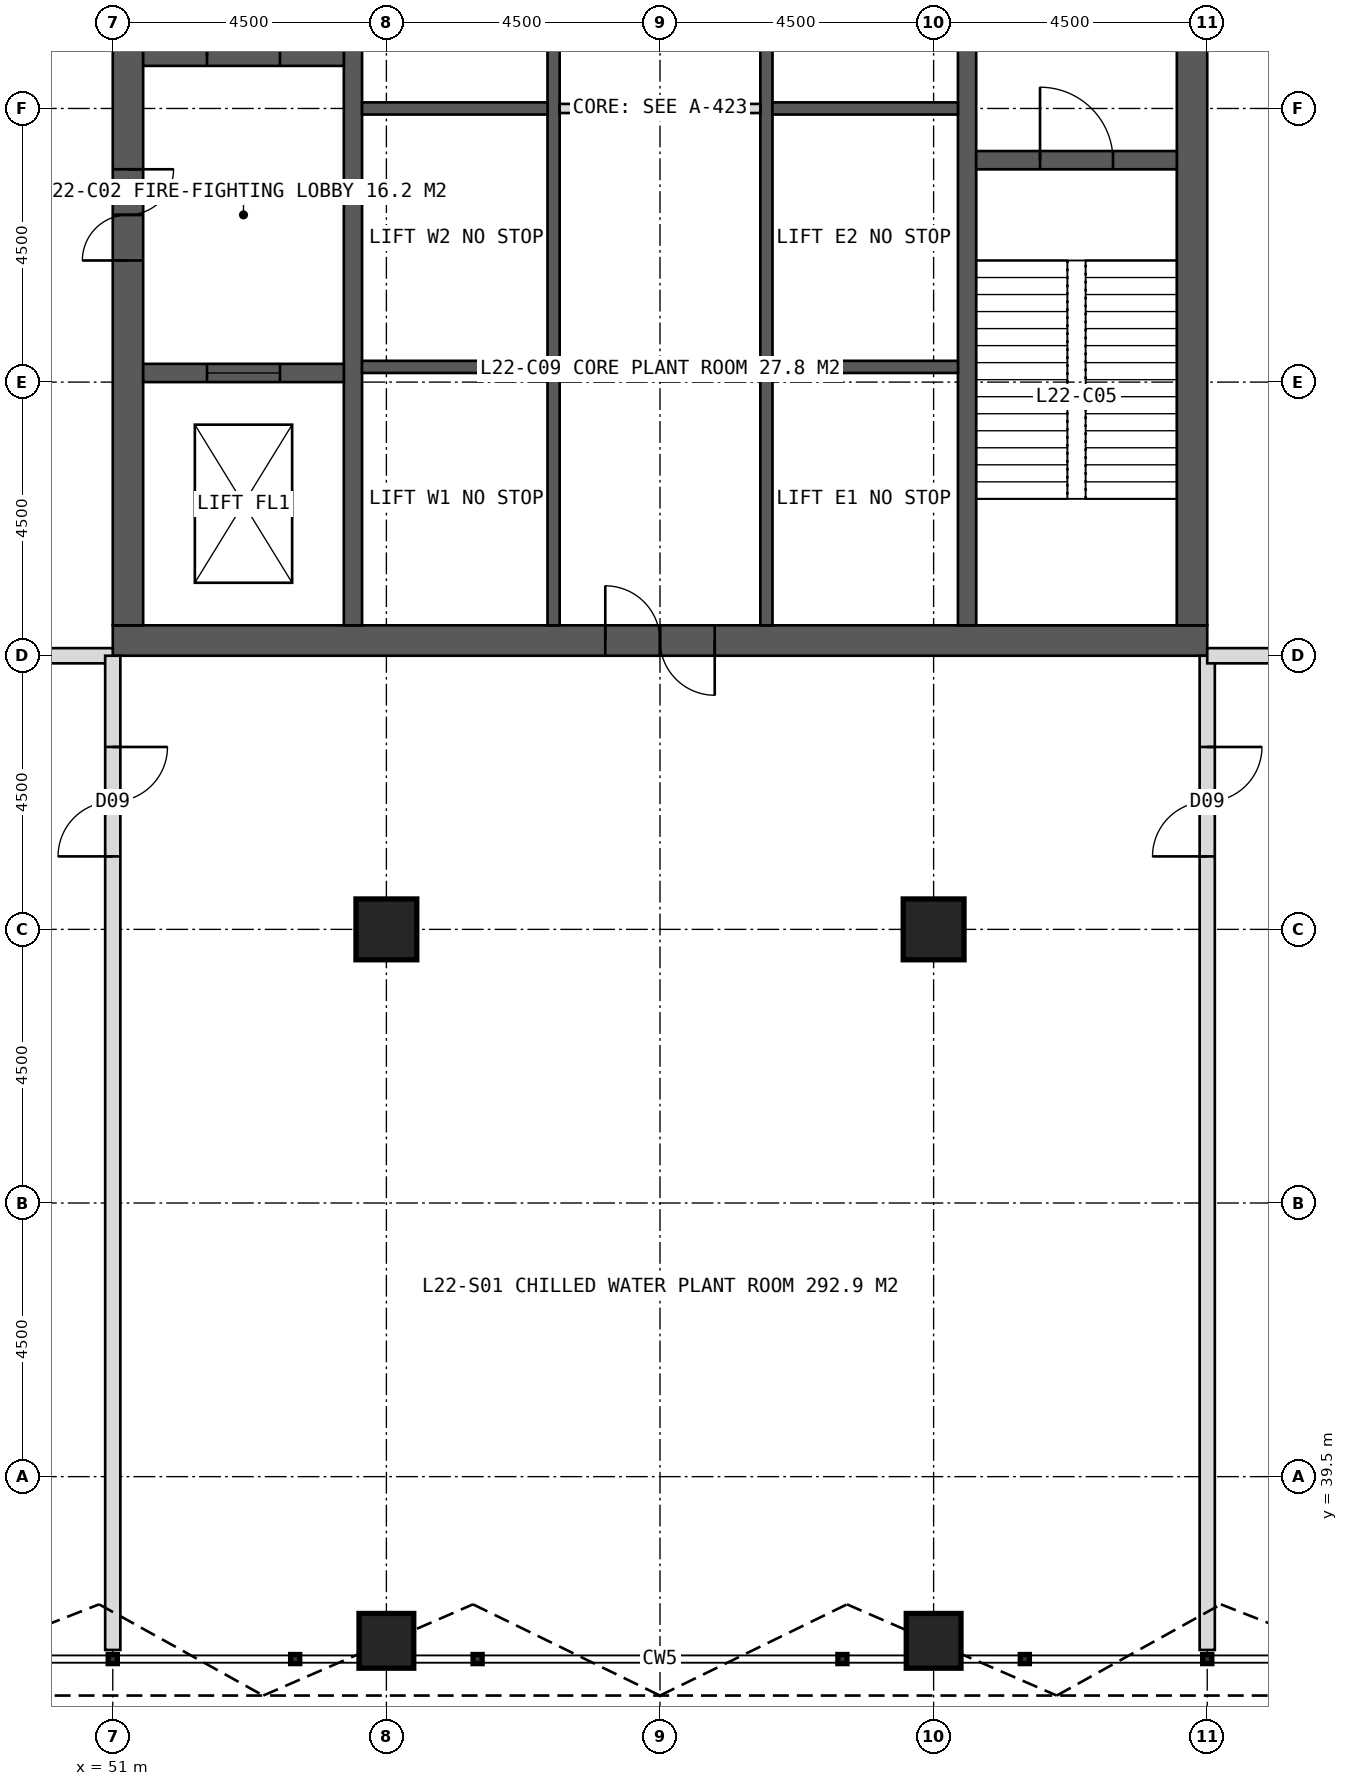
"""IFC4 building model, lengths in metres.
Left out: names, types, materials, properties, quantities, classifications, styles, units other than length and angle.
Written with IfcOpenShell. Run it as: python <this file> out.ifc"""

import sys

from ifc_helpers import new_model, si_unit, direction, frame, frame_2d, origin, origin_2d, place, context, subcontext, project, spatial, rectangle, hollow_rectangle, extrude, element, fill, save


model = new_model("IFC4")
c1 = context("Model", 3, precision=1e-05, world=origin(), true_north=direction((0.0, 1.0)))
c2 = subcontext(c1, "Body", "Model", "MODEL_VIEW")
j1 = project(units=[si_unit("LENGTHUNIT", "METRE"), si_unit("PLANEANGLEUNIT", "RADIAN")], contexts=[c1])
p1 = place(None, origin())
s1 = spatial("IfcSite", under=j1, at=p1, CompositionType="ELEMENT")
p2 = place(p1, origin())
s2 = spatial("IfcBuilding", under=s1, at=p2, CompositionType="ELEMENT")
p3 = place(p2, frame((0.0, 0.0, 95.0)))
s3 = spatial("IfcBuildingStorey", under=s2, at=p3, CompositionType="ELEMENT", Elevation=95.0)
p4 = place(p3, frame((51.0, 53.25, 0.0), z_axis=(0.0, 0.0, 1.0), x_axis=(1.0, 0.0, 0.0)))
e1 = element("IfcWall", 1, at=p4, inside=s3, PredefinedType="SHEAR", context=c2, shape_type="SweptSolid", body=[
    extrude(rectangle(XDim=18.0, YDim=0.5, at=frame_2d((9.0, 0.0))), origin(), (0.0, 0.0, 1.0), 5.0),
])
p5 = place(p4, frame((8.1, 0.0, 0.0)))
e2 = element("IfcOpeningElement", 2, at=p5, cuts=e1, PredefinedType="OPENING", context=c2, shape_type="SweptSolid", body=[
    extrude(rectangle(XDim=1.8, YDim=2.2, at=frame_2d((0.9, 1.1))), frame((0.0, 0.26, 0.0), z_axis=(0.0, -1.0, 0.0), x_axis=(1.0, 0.0, 0.0)), (0.0, 0.0, 1.0), 0.52),
])
p6 = place(p3, frame((51.25, 53.5, 0.0), z_axis=(0.0, 0.0, 1.0), x_axis=(0.0, 1.0, 0.0)))
e3 = element("IfcWall", 3, at=p6, inside=s3, PredefinedType="SHEAR", context=c2, shape_type="SweptSolid", body=[
    extrude(rectangle(XDim=17.0, YDim=0.5, at=frame_2d((8.5, 0.0))), origin(), (0.0, 0.0, 1.0), 5.0),
])
p7 = place(p6, frame((6.0, 0.0, 0.0)))
e4 = element("IfcOpeningElement", 4, at=p7, cuts=e3, PredefinedType="OPENING", context=c2, shape_type="SweptSolid", body=[
    extrude(rectangle(XDim=1.5, YDim=2.2, at=frame_2d((0.75, 1.1))), frame((0.0, 0.26, 0.0), z_axis=(0.0, -1.0, 0.0), x_axis=(1.0, 0.0, 0.0)), (0.0, 0.0, 1.0), 0.52),
])
p8 = place(p3, frame((68.75, 53.5, 0.0), z_axis=(0.0, 0.0, 1.0), x_axis=(0.0, 1.0, 0.0)))
e5 = element("IfcWall", 5, at=p8, inside=s3, PredefinedType="SHEAR", context=c2, shape_type="SweptSolid", body=[
    extrude(rectangle(XDim=17.0, YDim=0.5, at=frame_2d((8.5, 0.0))), origin(), (0.0, 0.0, 1.0), 5.0),
])
p9 = place(p8, frame((9.5, 0.0, 0.0)))
e6 = element("IfcOpeningElement", 6, at=p9, cuts=e5, PredefinedType="OPENING", context=c2, shape_type="SweptSolid", body=[
    extrude(rectangle(XDim=1.5, YDim=2.2, at=frame_2d((0.75, 1.1))), frame((0.0, 0.26, 0.0), z_axis=(0.0, -1.0, 0.0), x_axis=(1.0, 0.0, 0.0)), (0.0, 0.0, 1.0), 0.52),
])
for number, where, z_axis, x_axis in (
    (7, (54.95, 53.5, 0.0), (0.0, 0.0, 1.0), (0.0, 1.0, 0.0)),
    (8, (65.05, 53.5, 0.0), (0.0, 0.0, 1.0), (0.0, 1.0, 0.0)),
):
    element("IfcWall", number, at=place(p3, frame(where, z_axis=z_axis, x_axis=x_axis)), inside=s3, PredefinedType="SHEAR", context=c2, shape_type="SweptSolid", body=[
        extrude(rectangle(XDim=17.0, YDim=0.3, at=frame_2d((8.5, 0.0))), origin(), (0.0, 0.0, 1.0), 5.0),
    ])
for number, where, z_axis, x_axis in (
    (9, (58.25, 53.5, 0.0), (0.0, 0.0, 1.0), (0.0, 1.0, 0.0)),
    (10, (61.75, 53.5, 0.0), (0.0, 0.0, 1.0), (0.0, 1.0, 0.0)),
):
    element("IfcWall", number, at=place(p3, frame(where, z_axis=z_axis, x_axis=x_axis)), inside=s3, PredefinedType="SHEAR", context=c2, shape_type="SweptSolid", body=[
        extrude(rectangle(XDim=17.0, YDim=0.2, at=frame_2d((8.5, 0.0))), origin(), (0.0, 0.0, 1.0), 5.0),
    ])
for number, where, z_axis, x_axis in (
    (11, (55.1, 57.75, 0.0), (0.0, 0.0, 1.0), (1.0, 0.0, 0.0)),
    (12, (61.85, 57.75, 0.0), (0.0, 0.0, 1.0), (1.0, 0.0, 0.0)),
    (13, (55.1, 62.0, 0.0), (0.0, 0.0, 1.0), (1.0, 0.0, 0.0)),
    (14, (61.85, 62.0, 0.0), (0.0, 0.0, 1.0), (1.0, 0.0, 0.0)),
):
    element("IfcWall", number, at=place(p3, frame(where, z_axis=z_axis, x_axis=x_axis)), inside=s3, PredefinedType="SHEAR", context=c2, shape_type="SweptSolid", body=[
        extrude(rectangle(XDim=3.05, YDim=0.2, at=frame_2d((1.525, 0.0))), origin(), (0.0, 0.0, 1.0), 5.0),
    ])
p10 = place(p3, frame((51.5, 62.85, 0.0), z_axis=(0.0, 0.0, 1.0), x_axis=(1.0, 0.0, 0.0)))
e15 = element("IfcWall", 15, at=p10, inside=s3, PredefinedType="SHEAR", context=c2, shape_type="SweptSolid", body=[
    extrude(rectangle(XDim=3.3, YDim=0.3, at=frame_2d((1.65, 0.0))), origin(), (0.0, 0.0, 1.0), 5.0),
])
p11 = place(p10, frame((1.05, 0.0, 0.0)))
e16 = element("IfcOpeningElement", 16, at=p11, cuts=e15, PredefinedType="OPENING", context=c2, shape_type="SweptSolid", body=[
    extrude(rectangle(XDim=1.2, YDim=2.1, at=frame_2d((0.6, 1.05))), frame((0.0, 0.16, 0.0), z_axis=(0.0, -1.0, 0.0), x_axis=(1.0, 0.0, 0.0)), (0.0, 0.0, 1.0), 0.32),
])
p12 = place(p3, frame((51.5, 57.65, 0.0), z_axis=(0.0, 0.0, 1.0), x_axis=(1.0, 0.0, 0.0)))
e17 = element("IfcWall", 17, at=p12, inside=s3, PredefinedType="SHEAR", context=c2, shape_type="SweptSolid", body=[
    extrude(rectangle(XDim=3.3, YDim=0.3, at=frame_2d((1.65, 0.0))), origin(), (0.0, 0.0, 1.0), 5.0),
])
p13 = place(p12, frame((1.05, 0.0, 0.0)))
e18 = element("IfcOpeningElement", 18, at=p13, cuts=e17, PredefinedType="OPENING", context=c2, shape_type="SweptSolid", body=[
    extrude(rectangle(XDim=1.2, YDim=2.2, at=frame_2d((0.6, 1.1))), frame((0.0, 0.16, 0.0), z_axis=(0.0, -1.0, 0.0), x_axis=(1.0, 0.0, 0.0)), (0.0, 0.0, 1.0), 0.32),
])
p14 = place(p3, frame((65.2, 61.15, 0.0), z_axis=(0.0, 0.0, 1.0), x_axis=(1.0, 0.0, 0.0)))
e19 = element("IfcWall", 19, at=p14, inside=s3, PredefinedType="SHEAR", context=c2, shape_type="SweptSolid", body=[
    extrude(rectangle(XDim=3.3, YDim=0.3, at=frame_2d((1.65, 0.0))), origin(), (0.0, 0.0, 1.0), 5.0),
])
p15 = place(p14, frame((1.05, 0.0, 0.0)))
e20 = element("IfcOpeningElement", 20, at=p15, cuts=e19, PredefinedType="OPENING", context=c2, shape_type="SweptSolid", body=[
    extrude(rectangle(XDim=1.2, YDim=2.1, at=frame_2d((0.6, 1.05))), frame((0.0, 0.16, 0.0), z_axis=(0.0, -1.0, 0.0), x_axis=(1.0, 0.0, 0.0)), (0.0, 0.0, 1.0), 0.32),
])
for number, where, z_axis, x_axis in (
    (21, (55.5, 48.5, 0.0), (0.0, 0.0, 1.0), (1.0, 0.0, 0.0)),
    (22, (64.5, 48.5, 0.0), (0.0, 0.0, 1.0), (1.0, 0.0, 0.0)),
):
    element("IfcColumn", number, at=place(p3, frame(where, z_axis=z_axis, x_axis=x_axis)), inside=s3, PredefinedType="COLUMN", context=c2, shape_type="SweptSolid", body=[
        extrude(hollow_rectangle(XDim=1.0, YDim=1.0, WallThickness=0.1, at=origin_2d()), origin(), (0.0, 0.0, 1.0), 5.0),
    ])
for number, where, z_axis, x_axis in (
    (23, (55.5, 36.8, 0.0), (0.0, 0.0, 1.0), (1.0, 0.0, 0.0)),
    (24, (64.5, 36.8, 0.0), (0.0, 0.0, 1.0), (1.0, 0.0, 0.0)),
):
    element("IfcColumn", number, at=place(p3, frame(where, z_axis=z_axis, x_axis=x_axis)), inside=s3, PredefinedType="COLUMN", context=c2, shape_type="SweptSolid", body=[
        extrude(hollow_rectangle(XDim=0.9, YDim=0.9, WallThickness=0.08, at=origin_2d()), origin(), (0.0, 0.0, 1.0), 5.0),
    ])
p16 = place(p3, frame((51.0, 53.0, 0.0), z_axis=(0.0, 0.0, 1.0), x_axis=(-1.0, 0.0, 0.0)))
e25 = element("IfcWall", 25, at=p16, inside=s3, PredefinedType="SOLIDWALL", context=c2, shape_type="SweptSolid", body=[
    extrude(rectangle(XDim=16.35, YDim=0.25, at=frame_2d((8.175, 0.0))), origin(), (0.0, 0.0, 1.0), 4.75),
])
p17 = place(p16, frame((1.5, 0.0, 0.0)))
e26 = element("IfcOpeningElement", 26, at=p17, cuts=e25, PredefinedType="OPENING", context=c2, shape_type="SweptSolid", body=[
    extrude(rectangle(XDim=1.8, YDim=2.2, at=frame_2d((0.9, 1.1))), frame((0.0, 0.135, 0.0), z_axis=(0.0, -1.0, 0.0), x_axis=(1.0, 0.0, 0.0)), (0.0, 0.0, 1.0), 0.27),
])
p18 = place(p3, frame((51.0, 53.0, 0.0), z_axis=(0.0, 0.0, 1.0), x_axis=(0.0, -1.0, 0.0)))
e27 = element("IfcWall", 27, at=p18, inside=s3, PredefinedType="SOLIDWALL", context=c2, shape_type="SweptSolid", body=[
    extrude(rectangle(XDim=16.35, YDim=0.25, at=frame_2d((8.175, 0.0))), origin(), (0.0, 0.0, 1.0), 4.75),
])
p19 = place(p18, frame((1.5, 0.0, 0.0)))
e28 = element("IfcOpeningElement", 28, at=p19, cuts=e27, PredefinedType="OPENING", context=c2, shape_type="SweptSolid", body=[
    extrude(rectangle(XDim=1.8, YDim=2.2, at=frame_2d((0.9, 1.1))), frame((0.0, 0.135, 0.0), z_axis=(0.0, -1.0, 0.0), x_axis=(1.0, 0.0, 0.0)), (0.0, 0.0, 1.0), 0.27),
])
p20 = place(p3, frame((69.0, 53.0, 0.0), z_axis=(0.0, 0.0, 1.0), x_axis=(0.0, -1.0, 0.0)))
e29 = element("IfcWall", 29, at=p20, inside=s3, PredefinedType="SOLIDWALL", context=c2, shape_type="SweptSolid", body=[
    extrude(rectangle(XDim=16.35, YDim=0.25, at=frame_2d((8.175, 0.0))), origin(), (0.0, 0.0, 1.0), 4.75),
])
p21 = place(p20, frame((1.5, 0.0, 0.0)))
e30 = element("IfcOpeningElement", 30, at=p21, cuts=e29, PredefinedType="OPENING", context=c2, shape_type="SweptSolid", body=[
    extrude(rectangle(XDim=1.8, YDim=2.2, at=frame_2d((0.9, 1.1))), frame((0.0, 0.135, 0.0), z_axis=(0.0, -1.0, 0.0), x_axis=(1.0, 0.0, 0.0)), (0.0, 0.0, 1.0), 0.27),
])
p22 = place(p3, frame((69.0, 53.0, 0.0), z_axis=(0.0, 0.0, 1.0), x_axis=(1.0, 0.0, 0.0)))
e31 = element("IfcWall", 31, at=p22, inside=s3, PredefinedType="SOLIDWALL", context=c2, shape_type="SweptSolid", body=[
    extrude(rectangle(XDim=16.35, YDim=0.25, at=frame_2d((8.175, 0.0))), origin(), (0.0, 0.0, 1.0), 4.75),
])
p23 = place(p22, frame((1.5, 0.0, 0.0)))
e32 = element("IfcOpeningElement", 32, at=p23, cuts=e31, PredefinedType="OPENING", context=c2, shape_type="SweptSolid", body=[
    extrude(rectangle(XDim=1.8, YDim=2.2, at=frame_2d((0.9, 1.1))), frame((0.0, 0.135, 0.0), z_axis=(0.0, -1.0, 0.0), x_axis=(1.0, 0.0, 0.0)), (0.0, 0.0, 1.0), 0.27),
])
p24 = place(p3, frame((58.35, 62.0, 0.0), z_axis=(0.0, 0.0, 1.0), x_axis=(1.0, 0.0, 0.0)))
e33 = element("IfcWall", 33, at=p24, inside=s3, PredefinedType="PARTITIONING", context=c2, shape_type="SweptSolid", body=[
    extrude(rectangle(XDim=3.3, YDim=0.15, at=frame_2d((1.65, 0.0))), origin(), (0.0, 0.0, 1.0), 4.75),
])
p25 = place(p19, origin())
e34 = element("IfcDoor", 34, at=p25, inside=s3, OperationType="DOUBLE_DOOR_SINGLE_SWING", PredefinedType="DOOR", context=c2, shape_type="SweptSolid", body=[
    extrude(rectangle(XDim=1.8, YDim=2.2, at=frame_2d((0.9, 1.1))), frame((0.0, 0.025, 0.0), z_axis=(0.0, -1.0, 0.0), x_axis=(1.0, 0.0, 0.0)), (0.0, 0.0, 1.0), 0.05),
])
fill(e28, e34)
p26 = place(p21, origin())
e35 = element("IfcDoor", 35, at=p26, inside=s3, OperationType="DOUBLE_DOOR_SINGLE_SWING", PredefinedType="DOOR", context=c2, shape_type="SweptSolid", body=[
    extrude(rectangle(XDim=1.8, YDim=2.2, at=frame_2d((0.9, 1.1))), frame((0.0, 0.025, 0.0), z_axis=(0.0, -1.0, 0.0), x_axis=(1.0, 0.0, 0.0)), (0.0, 0.0, 1.0), 0.05),
])
fill(e30, e35)
p27 = place(p7, origin())
e36 = element("IfcDoor", 36, at=p27, inside=s3, OperationType="DOUBLE_DOOR_SINGLE_SWING", PredefinedType="DOOR", context=c2, shape_type="SweptSolid", body=[
    extrude(rectangle(XDim=1.5, YDim=2.2, at=frame_2d((0.75, 1.1))), frame((0.0, 0.025, 0.0), z_axis=(0.0, -1.0, 0.0), x_axis=(1.0, 0.0, 0.0)), (0.0, 0.0, 1.0), 0.05),
])
fill(e4, e36)
p28 = place(p11, origin())
e37 = element("IfcDoor", 37, at=p28, inside=s3, OperationType="SINGLE_SWING_LEFT", PredefinedType="DOOR", context=c2, shape_type="SweptSolid", body=[
    extrude(rectangle(XDim=1.2, YDim=2.1, at=frame_2d((0.6, 1.05))), frame((0.0, 0.025, 0.0), z_axis=(0.0, -1.0, 0.0), x_axis=(1.0, 0.0, 0.0)), (0.0, 0.0, 1.0), 0.05),
])
fill(e16, e37)
p29 = place(p15, origin())
e38 = element("IfcDoor", 38, at=p29, inside=s3, OperationType="SINGLE_SWING_LEFT", PredefinedType="DOOR", context=c2, shape_type="SweptSolid", body=[
    extrude(rectangle(XDim=1.2, YDim=2.1, at=frame_2d((0.6, 1.05))), frame((0.0, 0.025, 0.0), z_axis=(0.0, -1.0, 0.0), x_axis=(1.0, 0.0, 0.0)), (0.0, 0.0, 1.0), 0.05),
])
fill(e20, e38)
p30 = place(p13, origin())
e39 = element("IfcDoor", 39, at=p30, inside=s3, OperationType="SLIDING_TO_LEFT", PredefinedType="DOOR", context=c2, shape_type="SweptSolid", body=[
    extrude(rectangle(XDim=1.2, YDim=2.2, at=frame_2d((0.6, 1.1))), frame((0.0, 0.025, 0.0), z_axis=(0.0, -1.0, 0.0), x_axis=(1.0, 0.0, 0.0)), (0.0, 0.0, 1.0), 0.05),
])
fill(e18, e39)
p31 = place(p5, origin())
e40 = element("IfcDoor", 40, at=p31, inside=s3, OperationType="DOUBLE_DOOR_SINGLE_SWING", PredefinedType="DOOR", context=c2, shape_type="SweptSolid", body=[
    extrude(rectangle(XDim=1.8, YDim=2.2, at=frame_2d((0.9, 1.1))), frame((0.0, 0.025, 0.0), z_axis=(0.0, -1.0, 0.0), x_axis=(1.0, 0.0, 0.0)), (0.0, 0.0, 1.0), 0.05),
])
fill(e2, e40)
save(model, sys.argv[1])
